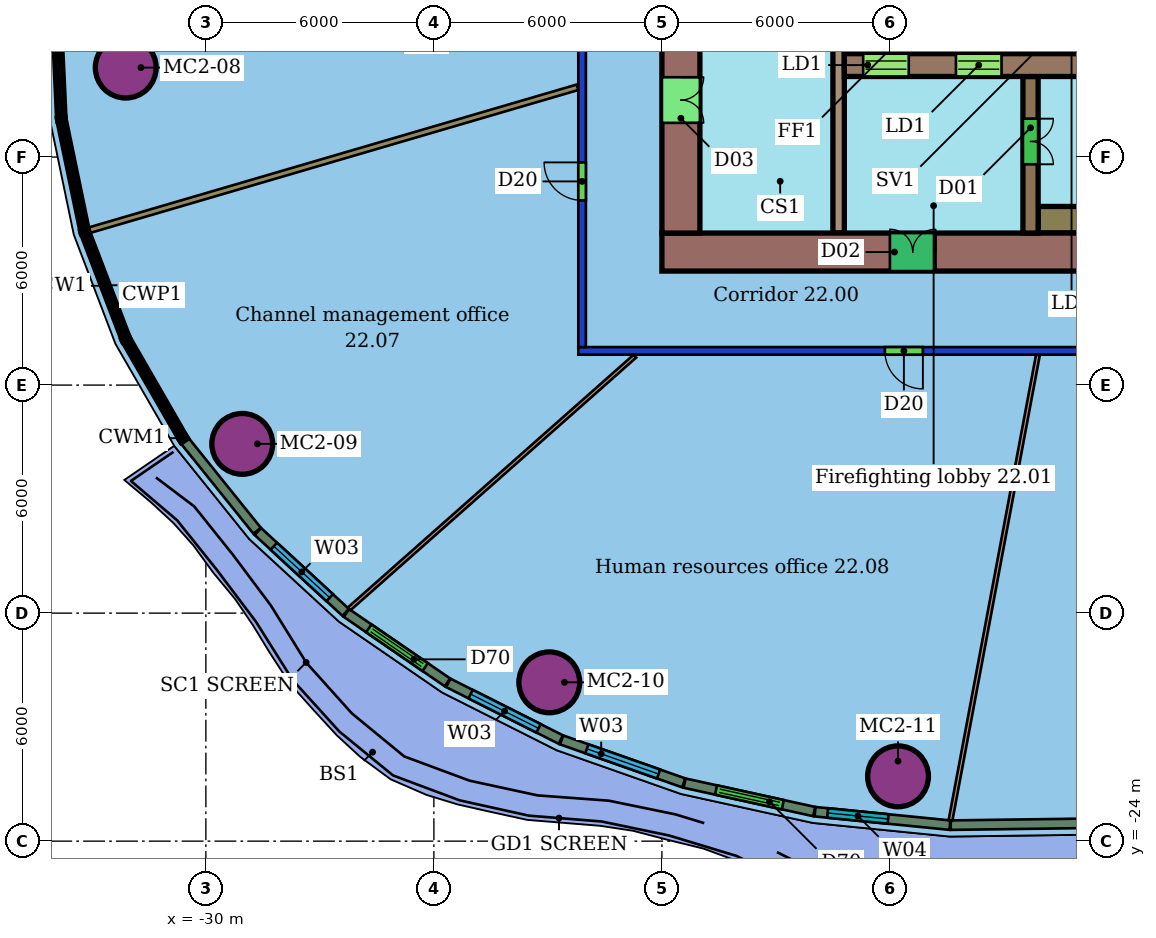
"""IFC4 building model, lengths in metres.
Left out: names, types, materials, properties, quantities, classifications, styles, units other than length and angle.
Written with IfcOpenShell. Run it as: python <this file> out.ifc"""

import sys

from ifc_helpers import new_model, si_unit, direction, frame, frame_2d, origin, origin_2d, place, context, subcontext, project, spatial, rectangle, hollow_circle, extrude, element, fill, save


model = new_model("IFC4")
c1 = context("Model", 3, precision=1e-05, world=origin(), true_north=direction((0.0, 1.0)))
c2 = subcontext(c1, "Body", "Model", "MODEL_VIEW")
j1 = project(units=[si_unit("LENGTHUNIT", "METRE"), si_unit("PLANEANGLEUNIT", "RADIAN")], contexts=[c1])
p1 = place(None, origin())
s1 = spatial("IfcSite", under=j1, at=p1, CompositionType="ELEMENT")
p2 = place(p1, origin())
s2 = spatial("IfcBuilding", under=s1, at=p2, CompositionType="ELEMENT")
p3 = place(p2, frame((0.0, 0.0, 99.4)))
s3 = spatial("IfcBuildingStorey", under=s2, at=p3, CompositionType="ELEMENT", Elevation=99.4)
for number, where, z_axis, x_axis in (
    (1, (-32.109, -3.646, 0.0), (0.0, 0.0, 1.0), (1.0, 0.0, 0.0)),
    (2, (-29.043, -13.547, 0.0), (0.0, 0.0, 1.0), (1.0, 0.0, 0.0)),
    (3, (-20.963, -19.821, 0.0), (0.0, 0.0, 1.0), (1.0, 0.0, 0.0)),
    (4, (-11.787, -22.294, 0.0), (0.0, 0.0, 1.0), (1.0, 0.0, 0.0)),
):
    element("IfcColumn", number, at=place(p3, frame(where, z_axis=z_axis, x_axis=x_axis)), inside=s3, PredefinedType="COLUMN", context=c2, shape_type="SweptSolid", body=[
        extrude(hollow_circle(Radius=0.8, WallThickness=0.055, at=origin_2d()), origin(), (0.0, 0.0, 1.0), 3.45),
    ])
p4 = place(p3, frame((8.2, -11.1, 0.0), z_axis=(0.0, 0.0, 1.0), x_axis=(-1.0, 0.0, 0.0)))
e5 = element("IfcWall", 5, at=p4, inside=s3, PredefinedType="PARTITIONING", context=c2, shape_type="SweptSolid", body=[
    extrude(rectangle(XDim=28.4, YDim=0.2, at=frame_2d((14.2, 0.0))), origin(), (0.0, 0.0, 1.0), 3.0),
])
p5 = place(p4, frame((19.333, 0.0, 0.0)))
e6 = element("IfcOpeningElement", 6, at=p5, cuts=e5, PredefinedType="OPENING", context=c2, shape_type="SweptSolid", body=[
    extrude(rectangle(XDim=1.0, YDim=2.1, at=frame_2d((0.5, 1.05))), frame((0.0, 0.11, 0.0), z_axis=(0.0, -1.0, 0.0), x_axis=(1.0, 0.0, 0.0)), (0.0, 0.0, 1.0), 0.22),
])
p6 = place(p4, frame((9.983, 0.0, 0.0)))
e7 = element("IfcOpeningElement", 7, at=p6, cuts=e5, PredefinedType="OPENING", context=c2, shape_type="SweptSolid", body=[
    extrude(rectangle(XDim=1.8, YDim=2.1, at=frame_2d((0.9, 1.05))), frame((0.0, 0.11, 0.0), z_axis=(0.0, -1.0, 0.0), x_axis=(1.0, 0.0, 0.0)), (0.0, 0.0, 1.0), 0.22),
])
p7 = place(p3, frame((-20.1, -11.0, 0.0), z_axis=(0.0, 0.0, 1.0), x_axis=(0.0, 1.0, 0.0)))
e8 = element("IfcWall", 8, at=p7, inside=s3, PredefinedType="PARTITIONING", context=c2, shape_type="SweptSolid", body=[
    extrude(rectangle(XDim=22.0, YDim=0.2, at=frame_2d((11.0, 0.0))), origin(), (0.0, 0.0, 1.0), 3.0),
])
p8 = place(p7, frame((15.778, 0.0, 0.0)))
e9 = element("IfcOpeningElement", 9, at=p8, cuts=e8, PredefinedType="OPENING", context=c2, shape_type="SweptSolid", body=[
    extrude(rectangle(XDim=1.5, YDim=2.1, at=frame_2d((0.75, 1.05))), frame((0.0, 0.11, 0.0), z_axis=(0.0, -1.0, 0.0), x_axis=(1.0, 0.0, 0.0)), (0.0, 0.0, 1.0), 0.22),
])
p9 = place(p7, frame((8.161, 0.0, 0.0)))
e10 = element("IfcOpeningElement", 10, at=p9, cuts=e8, PredefinedType="OPENING", context=c2, shape_type="SweptSolid", body=[
    extrude(rectangle(XDim=0.9, YDim=2.1, at=frame_2d((0.45, 1.05))), frame((0.0, 0.11, 0.0), z_axis=(0.0, -1.0, 0.0), x_axis=(1.0, 0.0, 0.0)), (0.0, 0.0, 1.0), 0.22),
])
p10 = place(p7, frame((3.86, 0.0, 0.0)))
e11 = element("IfcOpeningElement", 11, at=p10, cuts=e8, PredefinedType="OPENING", context=c2, shape_type="SweptSolid", body=[
    extrude(rectangle(XDim=1.0, YDim=2.1, at=frame_2d((0.5, 1.05))), frame((0.0, 0.11, 0.0), z_axis=(0.0, -1.0, 0.0), x_axis=(1.0, 0.0, 0.0)), (0.0, 0.0, 1.0), 0.22),
])
p11 = place(p3, frame((-33.067, -7.925, 0.0), z_axis=(0.0, 0.0, 1.0), x_axis=(0.959703459694, 0.281014713942, 0.0)))
e12 = element("IfcWall", 12, at=p11, inside=s3, PredefinedType="PARTITIONING", context=c2, shape_type="SweptSolid", body=[
    extrude(rectangle(XDim=13.385, YDim=0.15, at=frame_2d((6.693, 0.0))), origin(), (0.0, 0.0, 1.0), 3.45),
])
p12 = place(p3, frame((-26.233, -17.892, 0.0), z_axis=(0.0, 0.0, 1.0), x_axis=(0.749135252735, 0.662417068854, 0.0)))
e13 = element("IfcWall", 13, at=p12, inside=s3, PredefinedType="PARTITIONING", context=c2, shape_type="SweptSolid", body=[
    extrude(rectangle(XDim=10.045, YDim=0.1, at=frame_2d((5.022, 0.0))), origin(), (0.0, 0.0, 1.0), 3.45),
])
p13 = place(p3, frame((-10.406, -23.455, 0.0), z_axis=(0.0, 0.0, 1.0), x_axis=(0.184602041508, 0.982813352713, 0.0)))
e14 = element("IfcWall", 14, at=p13, inside=s3, PredefinedType="PARTITIONING", context=c2, shape_type="SweptSolid", body=[
    extrude(rectangle(XDim=12.459, YDim=0.1, at=frame_2d((6.23, 0.0))), origin(), (0.0, 0.0, 1.0), 3.45),
])
p14 = place(p3, frame((-30.551, -13.471, 0.0), z_axis=(0.0, 0.0, 1.0), x_axis=(0.626892577284, -0.779105703064, 0.0)))
e15 = element("IfcWall", 15, at=p14, inside=s3, PredefinedType="SOLIDWALL", context=c2, shape_type="SweptSolid", body=[
    extrude(rectangle(XDim=3.031, YDim=0.25, at=frame_2d((1.516, 0.0))), origin(), (0.0, 0.0, 1.0), 3.05),
])
p15 = place(p3, frame((-28.632, -15.852, 0.0), z_axis=(0.0, 0.0, 1.0), x_axis=(0.735604195004, -0.677411594448, 0.0)))
e16 = element("IfcWall", 16, at=p15, inside=s3, PredefinedType="SOLIDWALL", context=c2, shape_type="SweptSolid", body=[
    extrude(rectangle(XDim=3.142, YDim=0.25, at=frame_2d((1.571, 0.0))), origin(), (0.0, 0.0, 1.0), 3.05),
])
p16 = place(p15, frame((0.571, 0.0, 0.9)))
e17 = element("IfcOpeningElement", 17, at=p16, cuts=e16, PredefinedType="OPENING", context=c2, shape_type="SweptSolid", body=[
    extrude(rectangle(XDim=2.0, YDim=2.1, at=frame_2d((1.0, 1.05))), frame((0.0, 0.135, 0.0), z_axis=(0.0, -1.0, 0.0), x_axis=(1.0, 0.0, 0.0)), (0.0, 0.0, 1.0), 0.27),
])
p17 = place(p3, frame((-26.301, -17.997, 0.0), z_axis=(0.0, 0.0, 1.0), x_axis=(0.824260519644, -0.566210734405, 0.0)))
e18 = element("IfcWall", 18, at=p17, inside=s3, PredefinedType="SOLIDWALL", context=c2, shape_type="SweptSolid", body=[
    extrude(rectangle(XDim=3.225, YDim=0.25, at=frame_2d((1.613, 0.0))), origin(), (0.0, 0.0, 1.0), 3.05),
])
p18 = place(p17, frame((0.713, 0.0, 0.0)))
e19 = element("IfcOpeningElement", 19, at=p18, cuts=e18, PredefinedType="OPENING", context=c2, shape_type="SweptSolid", body=[
    extrude(rectangle(XDim=1.8, YDim=2.4, at=frame_2d((0.9, 1.2))), frame((0.0, 0.135, 0.0), z_axis=(0.0, -1.0, 0.0), x_axis=(1.0, 0.0, 0.0)), (0.0, 0.0, 1.0), 0.27),
])
p19 = place(p3, frame((-23.621, -19.835, 0.0), z_axis=(0.0, 0.0, 1.0), x_axis=(0.893097754404, -0.449862646904, 0.0)))
e20 = element("IfcWall", 20, at=p19, inside=s3, PredefinedType="SOLIDWALL", context=c2, shape_type="SweptSolid", body=[
    extrude(rectangle(XDim=3.315, YDim=0.25, at=frame_2d((1.658, 0.0))), origin(), (0.0, 0.0, 1.0), 3.05),
])
p20 = place(p19, frame((0.658, 0.0, 0.9)))
e21 = element("IfcOpeningElement", 21, at=p20, cuts=e20, PredefinedType="OPENING", context=c2, shape_type="SweptSolid", body=[
    extrude(rectangle(XDim=2.0, YDim=2.1, at=frame_2d((1.0, 1.05))), frame((0.0, 0.135, 0.0), z_axis=(0.0, -1.0, 0.0), x_axis=(1.0, 0.0, 0.0)), (0.0, 0.0, 1.0), 0.27),
])
p21 = place(p3, frame((-20.638, -21.336, 0.0), z_axis=(0.0, 0.0, 1.0), x_axis=(0.94334314228, -0.331818799819, 0.0)))
e22 = element("IfcWall", 22, at=p21, inside=s3, PredefinedType="SOLIDWALL", context=c2, shape_type="SweptSolid", body=[
    extrude(rectangle(XDim=3.406, YDim=0.25, at=frame_2d((1.703, 0.0))), origin(), (0.0, 0.0, 1.0), 3.05),
])
p22 = place(p21, frame((0.703, 0.0, 0.9)))
e23 = element("IfcOpeningElement", 23, at=p22, cuts=e22, PredefinedType="OPENING", context=c2, shape_type="SweptSolid", body=[
    extrude(rectangle(XDim=2.0, YDim=2.1, at=frame_2d((1.0, 1.05))), frame((0.0, 0.135, 0.0), z_axis=(0.0, -1.0, 0.0), x_axis=(1.0, 0.0, 0.0)), (0.0, 0.0, 1.0), 0.27),
])
p23 = place(p3, frame((-17.403, -22.473, 0.0), z_axis=(0.0, 0.0, 1.0), x_axis=(0.976728623895, -0.214478892352, 0.0)))
e24 = element("IfcWall", 24, at=p23, inside=s3, PredefinedType="SOLIDWALL", context=c2, shape_type="SweptSolid", body=[
    extrude(rectangle(XDim=3.491, YDim=0.25, at=frame_2d((1.746, 0.0))), origin(), (0.0, 0.0, 1.0), 3.05),
])
p24 = place(p23, frame((0.846, 0.0, 0.0)))
e25 = element("IfcOpeningElement", 25, at=p24, cuts=e24, PredefinedType="OPENING", context=c2, shape_type="SweptSolid", body=[
    extrude(rectangle(XDim=1.8, YDim=2.4, at=frame_2d((0.9, 1.2))), frame((0.0, 0.135, 0.0), z_axis=(0.0, -1.0, 0.0), x_axis=(1.0, 0.0, 0.0)), (0.0, 0.0, 1.0), 0.27),
])
p25 = place(p3, frame((-13.97, -23.225, 0.0), z_axis=(0.0, 0.0, 1.0), x_axis=(0.995080479837, -0.099069867505, 0.0)))
e26 = element("IfcWall", 26, at=p25, inside=s3, PredefinedType="SOLIDWALL", context=c2, shape_type="SweptSolid", body=[
    extrude(rectangle(XDim=3.566, YDim=0.25, at=frame_2d((1.783, 0.0))), origin(), (0.0, 0.0, 1.0), 3.05),
])
p26 = place(p25, frame((0.333, 0.0, 0.9)))
e27 = element("IfcOpeningElement", 27, at=p26, cuts=e26, PredefinedType="OPENING", context=c2, shape_type="SweptSolid", body=[
    extrude(rectangle(XDim=1.6, YDim=2.1, at=frame_2d((0.8, 1.05))), frame((0.0, 0.135, 0.0), z_axis=(0.0, -1.0, 0.0), x_axis=(1.0, 0.0, 0.0)), (0.0, 0.0, 1.0), 0.27),
])
p27 = place(p3, frame((-10.4, -23.579, 0.0), z_axis=(0.0, 0.0, 1.0), x_axis=(0.999907981657, 0.013565700051, 0.0)))
e28 = element("IfcWall", 28, at=p27, inside=s3, PredefinedType="SOLIDWALL", context=c2, shape_type="SweptSolid", body=[
    extrude(rectangle(XDim=3.581, YDim=0.25, at=frame_2d((1.791, 0.0))), origin(), (0.0, 0.0, 1.0), 3.05),
])
p28 = place(p3, frame((-18.0, -8.5, 0.0), z_axis=(0.0, 0.0, 1.0), x_axis=(1.0, 0.0, 0.0)))
e29 = element("IfcWall", 29, at=p28, inside=s3, PredefinedType="SHEAR", context=c2, shape_type="SweptSolid", body=[
    extrude(rectangle(XDim=24.0, YDim=1.0, at=frame_2d((12.0, 0.0))), origin(), (0.0, 0.0, 1.0), 3.3),
])
p29 = place(p28, frame((6.0, 0.0, 0.0)))
e30 = element("IfcOpeningElement", 30, at=p29, cuts=e29, PredefinedType="OPENING", context=c2, shape_type="SweptSolid", body=[
    extrude(rectangle(XDim=1.2, YDim=2.1, at=frame_2d((0.6, 1.05))), frame((0.0, 0.51, 0.0), z_axis=(0.0, -1.0, 0.0), x_axis=(1.0, 0.0, 0.0)), (0.0, 0.0, 1.0), 1.02),
])
p30 = place(p3, frame((-17.5, 8.0, 0.0), z_axis=(0.0, 0.0, 1.0), x_axis=(0.0, -1.0, 0.0)))
e31 = element("IfcWall", 31, at=p30, inside=s3, PredefinedType="SHEAR", context=c2, shape_type="SweptSolid", body=[
    extrude(rectangle(XDim=16.0, YDim=1.0, at=frame_2d((8.0, 0.0))), origin(), (0.0, 0.0, 1.0), 3.3),
])
p31 = place(p30, frame((11.9, 0.0, 0.0)))
e32 = element("IfcOpeningElement", 32, at=p31, cuts=e31, PredefinedType="OPENING", context=c2, shape_type="SweptSolid", body=[
    extrude(rectangle(XDim=1.2, YDim=2.1, at=frame_2d((0.6, 1.05))), frame((0.0, 0.51, 0.0), z_axis=(0.0, -1.0, 0.0), x_axis=(1.0, 0.0, 0.0)), (0.0, 0.0, 1.0), 1.02),
])
p32 = place(p30, frame((2.9, 0.0, 0.0)))
e33 = element("IfcOpeningElement", 33, at=p32, cuts=e31, PredefinedType="OPENING", context=c2, shape_type="SweptSolid", body=[
    extrude(rectangle(XDim=1.2, YDim=2.1, at=frame_2d((0.6, 1.05))), frame((0.0, 0.51, 0.0), z_axis=(0.0, -1.0, 0.0), x_axis=(1.0, 0.0, 0.0)), (0.0, 0.0, 1.0), 1.02),
])
p33 = place(p3, frame((-13.2, -3.58, 0.0), z_axis=(0.0, 0.0, 1.0), x_axis=(1.0, 0.0, 0.0)))
e34 = element("IfcWall", 34, at=p33, inside=s3, PredefinedType="SHEAR", context=c2, shape_type="SweptSolid", body=[
    extrude(rectangle(XDim=7.2, YDim=0.6, at=frame_2d((3.6, 0.0))), origin(), (0.0, 0.0, 1.0), 3.3),
])
p34 = place(p33, frame((0.496, 0.0, 0.0)))
e35 = element("IfcOpeningElement", 35, at=p34, cuts=e34, PredefinedType="OPENING", context=c2, shape_type="SweptSolid", body=[
    extrude(rectangle(XDim=1.2, YDim=2.1, at=frame_2d((0.6, 1.05))), frame((0.0, 0.31, 0.0), z_axis=(0.0, -1.0, 0.0), x_axis=(1.0, 0.0, 0.0)), (0.0, 0.0, 1.0), 0.62),
])
p35 = place(p33, frame((2.938, 0.0, 0.0)))
e36 = element("IfcOpeningElement", 36, at=p35, cuts=e34, PredefinedType="OPENING", context=c2, shape_type="SweptSolid", body=[
    extrude(rectangle(XDim=1.2, YDim=2.1, at=frame_2d((0.6, 1.05))), frame((0.0, 0.31, 0.0), z_axis=(0.0, -1.0, 0.0), x_axis=(1.0, 0.0, 0.0)), (0.0, 0.0, 1.0), 0.62),
])
p36 = place(p3, frame((-13.35, 8.0, 0.0), z_axis=(0.0, 0.0, 1.0), x_axis=(0.0, -1.0, 0.0)))
e37 = element("IfcWall", 37, at=p36, inside=s3, PredefinedType="SHEAR", context=c2, shape_type="SweptSolid", body=[
    extrude(rectangle(XDim=16.0, YDim=0.3, at=frame_2d((8.0, 0.0))), origin(), (0.0, 0.0, 1.0), 3.3),
])
p37 = place(p36, frame((7.25, 0.0, 0.0)))
e38 = element("IfcOpeningElement", 38, at=p37, cuts=e37, PredefinedType="OPENING", context=c2, shape_type="SweptSolid", body=[
    extrude(rectangle(XDim=1.5, YDim=2.1, at=frame_2d((0.75, 1.05))), frame((0.0, 0.16, 0.0), z_axis=(0.0, -1.0, 0.0), x_axis=(1.0, 0.0, 0.0)), (0.0, 0.0, 1.0), 0.32),
])
p38 = place(p3, frame((-8.3, -3.88, 0.0), z_axis=(0.0, 0.0, 1.0), x_axis=(0.0, -1.0, 0.0)))
e39 = element("IfcWall", 39, at=p38, inside=s3, PredefinedType="SHEAR", context=c2, shape_type="SweptSolid", body=[
    extrude(rectangle(XDim=4.12, YDim=0.4, at=frame_2d((2.06, 0.0))), origin(), (0.0, 0.0, 1.0), 3.3),
])
p39 = place(p38, frame((1.11, 0.0, 0.0)))
e40 = element("IfcOpeningElement", 40, at=p39, cuts=e39, PredefinedType="OPENING", context=c2, shape_type="SweptSolid", body=[
    extrude(rectangle(XDim=1.2, YDim=2.1, at=frame_2d((0.6, 1.05))), frame((0.0, 0.21, 0.0), z_axis=(0.0, -1.0, 0.0), x_axis=(1.0, 0.0, 0.0)), (0.0, 0.0, 1.0), 0.42),
])
p40 = place(p3, frame((-8.1, -7.65, 0.0), z_axis=(0.0, 0.0, 1.0), x_axis=(1.0, 0.0, 0.0)))
e41 = element("IfcWall", 41, at=p40, inside=s3, PredefinedType="SHEAR", context=c2, shape_type="SweptSolid", body=[
    extrude(rectangle(XDim=7.05, YDim=0.7, at=frame_2d((3.525, 0.0))), origin(), (0.0, 0.0, 1.0), 3.3),
])
for number, where, z_axis, x_axis in (
    (42, (-10.883, -1.6, 0.0), (0.0, 0.0, 1.0), (0.0, -1.0, 0.0)),
    (43, (-8.442, -1.6, 0.0), (0.0, 0.0, 1.0), (0.0, -1.0, 0.0)),
):
    element("IfcWall", number, at=place(p3, frame(where, z_axis=z_axis, x_axis=x_axis)), inside=s3, PredefinedType="SHEAR", context=c2, shape_type="SweptSolid", body=[
        extrude(rectangle(XDim=1.68, YDim=0.25, at=frame_2d((0.84, 0.0))), origin(), (0.0, 0.0, 1.0), 3.3),
    ])
p41 = place(p10, origin())
e44 = element("IfcDoor", 44, at=p41, inside=s3, OperationType="SINGLE_SWING_RIGHT", PredefinedType="DOOR", context=c2, shape_type="SweptSolid", body=[
    extrude(rectangle(XDim=1.0, YDim=2.1, at=frame_2d((0.5, 1.05))), frame((0.0, 0.025, 0.0), z_axis=(0.0, -1.0, 0.0), x_axis=(1.0, 0.0, 0.0)), (0.0, 0.0, 1.0), 0.05),
])
fill(e11, e44)
p42 = place(p5, origin())
e45 = element("IfcDoor", 45, at=p42, inside=s3, OperationType="SINGLE_SWING_LEFT", PredefinedType="DOOR", context=c2, shape_type="SweptSolid", body=[
    extrude(rectangle(XDim=1.0, YDim=2.1, at=frame_2d((0.5, 1.05))), frame((0.0, 0.025, 0.0), z_axis=(0.0, -1.0, 0.0), x_axis=(1.0, 0.0, 0.0)), (0.0, 0.0, 1.0), 0.05),
])
fill(e6, e45)
p43 = place(p16, origin())
e46 = element("IfcWindow", 46, at=p43, inside=s3, PartitioningType="SINGLE_PANEL", PredefinedType="WINDOW", context=c2, shape_type="SweptSolid", body=[
    extrude(rectangle(XDim=2.0, YDim=2.1, at=frame_2d((1.0, 1.05))), frame((0.0, 0.03, 0.0), z_axis=(0.0, -1.0, 0.0), x_axis=(1.0, 0.0, 0.0)), (0.0, 0.0, 1.0), 0.06),
])
fill(e17, e46)
p44 = place(p18, origin())
e47 = element("IfcDoor", 47, at=p44, inside=s3, OperationType="DOUBLE_DOOR_SLIDING", PredefinedType="DOOR", context=c2, shape_type="SweptSolid", body=[
    extrude(rectangle(XDim=1.8, YDim=2.4, at=frame_2d((0.9, 1.2))), frame((0.0, 0.025, 0.0), z_axis=(0.0, -1.0, 0.0), x_axis=(1.0, 0.0, 0.0)), (0.0, 0.0, 1.0), 0.05),
])
fill(e19, e47)
p45 = place(p20, origin())
e48 = element("IfcWindow", 48, at=p45, inside=s3, PartitioningType="SINGLE_PANEL", PredefinedType="WINDOW", context=c2, shape_type="SweptSolid", body=[
    extrude(rectangle(XDim=2.0, YDim=2.1, at=frame_2d((1.0, 1.05))), frame((0.0, 0.03, 0.0), z_axis=(0.0, -1.0, 0.0), x_axis=(1.0, 0.0, 0.0)), (0.0, 0.0, 1.0), 0.06),
])
fill(e21, e48)
p46 = place(p22, origin())
e49 = element("IfcWindow", 49, at=p46, inside=s3, PartitioningType="SINGLE_PANEL", PredefinedType="WINDOW", context=c2, shape_type="SweptSolid", body=[
    extrude(rectangle(XDim=2.0, YDim=2.1, at=frame_2d((1.0, 1.05))), frame((0.0, 0.03, 0.0), z_axis=(0.0, -1.0, 0.0), x_axis=(1.0, 0.0, 0.0)), (0.0, 0.0, 1.0), 0.06),
])
fill(e23, e49)
p47 = place(p24, origin())
e50 = element("IfcDoor", 50, at=p47, inside=s3, OperationType="DOUBLE_DOOR_SLIDING", PredefinedType="DOOR", context=c2, shape_type="SweptSolid", body=[
    extrude(rectangle(XDim=1.8, YDim=2.4, at=frame_2d((0.9, 1.2))), frame((0.0, 0.025, 0.0), z_axis=(0.0, -1.0, 0.0), x_axis=(1.0, 0.0, 0.0)), (0.0, 0.0, 1.0), 0.05),
])
fill(e25, e50)
p48 = place(p26, origin())
e51 = element("IfcWindow", 51, at=p48, inside=s3, PartitioningType="SINGLE_PANEL", PredefinedType="WINDOW", context=c2, shape_type="SweptSolid", body=[
    extrude(rectangle(XDim=1.6, YDim=2.1, at=frame_2d((0.8, 1.05))), frame((0.0, 0.03, 0.0), z_axis=(0.0, -1.0, 0.0), x_axis=(1.0, 0.0, 0.0)), (0.0, 0.0, 1.0), 0.06),
])
fill(e27, e51)
p49 = place(p29, origin())
e52 = element("IfcDoor", 52, at=p49, inside=s3, OperationType="DOUBLE_DOOR_SINGLE_SWING", PredefinedType="NOTDEFINED", context=c2, shape_type="SweptSolid", body=[
    extrude(rectangle(XDim=1.2, YDim=2.1, at=frame_2d((0.6, 1.05))), frame((0.0, 0.025, 0.0), z_axis=(0.0, -1.0, 0.0), x_axis=(1.0, 0.0, 0.0)), (0.0, 0.0, 1.0), 0.05),
])
fill(e30, e52)
p50 = place(p31, origin())
e53 = element("IfcDoor", 53, at=p50, inside=s3, OperationType="DOUBLE_DOOR_SINGLE_SWING", PredefinedType="NOTDEFINED", context=c2, shape_type="SweptSolid", body=[
    extrude(rectangle(XDim=1.2, YDim=2.1, at=frame_2d((0.6, 1.05))), frame((0.0, 0.025, 0.0), z_axis=(0.0, -1.0, 0.0), x_axis=(1.0, 0.0, 0.0)), (0.0, 0.0, 1.0), 0.05),
])
fill(e32, e53)
p51 = place(p34, origin())
e54 = element("IfcDoor", 54, at=p51, inside=s3, OperationType="DOUBLE_DOOR_SLIDING", PredefinedType="NOTDEFINED", context=c2, shape_type="SweptSolid", body=[
    extrude(rectangle(XDim=1.2, YDim=2.1, at=frame_2d((0.6, 1.05))), frame((0.0, 0.025, 0.0), z_axis=(0.0, -1.0, 0.0), x_axis=(1.0, 0.0, 0.0)), (0.0, 0.0, 1.0), 0.05),
])
fill(e35, e54)
p52 = place(p35, origin())
e55 = element("IfcDoor", 55, at=p52, inside=s3, OperationType="DOUBLE_DOOR_SLIDING", PredefinedType="NOTDEFINED", context=c2, shape_type="SweptSolid", body=[
    extrude(rectangle(XDim=1.2, YDim=2.1, at=frame_2d((0.6, 1.05))), frame((0.0, 0.025, 0.0), z_axis=(0.0, -1.0, 0.0), x_axis=(1.0, 0.0, 0.0)), (0.0, 0.0, 1.0), 0.05),
])
fill(e36, e55)
p53 = place(p39, origin())
e56 = element("IfcDoor", 56, at=p53, inside=s3, OperationType="DOUBLE_DOOR_SINGLE_SWING", PredefinedType="NOTDEFINED", context=c2, shape_type="SweptSolid", body=[
    extrude(rectangle(XDim=1.2, YDim=2.1, at=frame_2d((0.6, 1.05))), frame((0.0, 0.025, 0.0), z_axis=(0.0, -1.0, 0.0), x_axis=(1.0, 0.0, 0.0)), (0.0, 0.0, 1.0), 0.05),
])
fill(e40, e56)
save(model, sys.argv[1])
